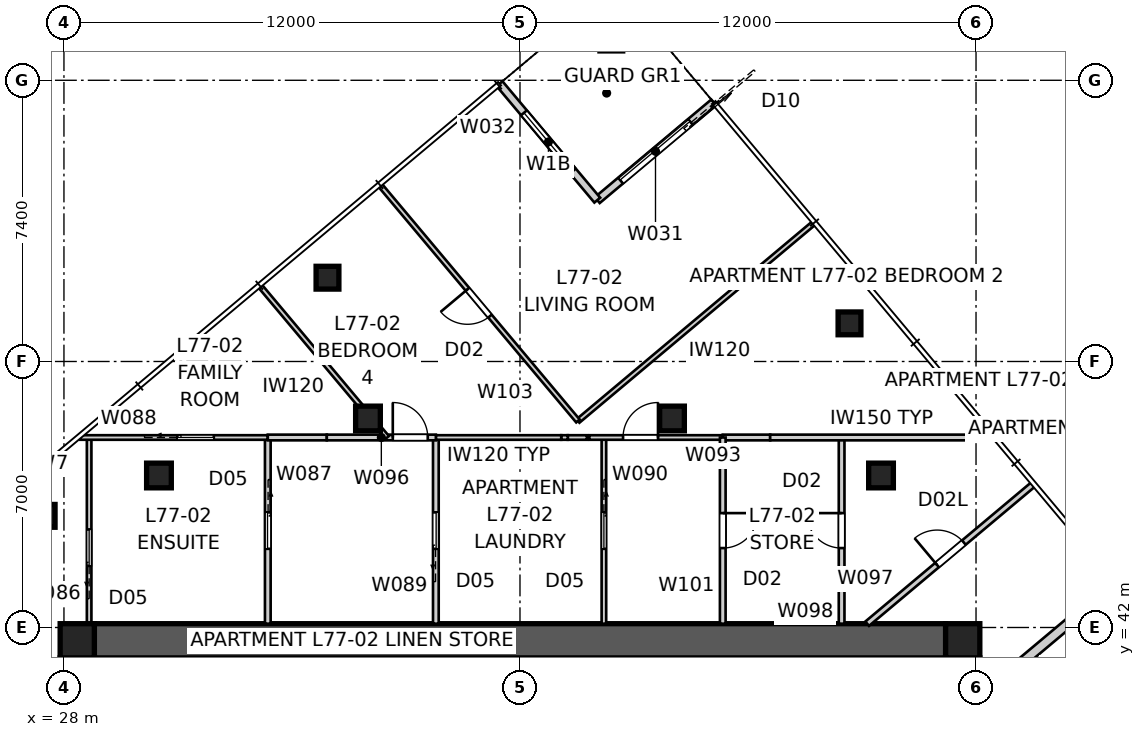
"""IFC4 building model, lengths in metres.
Left out: names, types, materials, properties, quantities, classifications, styles, units other than length and angle.
Written with IfcOpenShell. Run it as: python <this file> out.ifc"""

import sys

from ifc_helpers import new_model, si_unit, direction, frame, frame_2d, origin, origin_2d, place, context, subcontext, project, spatial, polyline, rectangle, outline, extrude, element, fill, save


model = new_model("IFC4")
c1 = context("Model", 3, precision=1e-05, world=origin(), true_north=direction((0.0, 1.0)))
c2 = subcontext(c1, "Body", "Model", "MODEL_VIEW")
j1 = project(units=[si_unit("LENGTHUNIT", "METRE"), si_unit("PLANEANGLEUNIT", "RADIAN")], contexts=[c1])
p1 = place(None, origin())
s1 = spatial("IfcSite", under=j1, at=p1, CompositionType="ELEMENT")
p2 = place(p1, origin())
s2 = spatial("IfcBuilding", under=s1, at=p2, CompositionType="ELEMENT")
p3 = place(p2, frame((0.0, 0.0, 279.4)))
s3 = spatial("IfcBuildingStorey", under=s2, at=p3, CompositionType="ELEMENT", Elevation=279.4)
p4 = place(p3, frame((28.8, 41.65, 0.0), z_axis=(0.0, 0.0, 1.0), x_axis=(1.0, 0.0, 0.0)))
e1 = element("IfcWall", 1, at=p4, inside=s3, PredefinedType="SHEAR", context=c2, shape_type="SweptSolid", body=[
    extrude(outline(polyline([(0.0, -0.45), (22.4, -0.45), (22.4, -0.025), (22.85, -0.025), (22.85, 0.025), (22.4, 0.025), (22.4, 0.45), (0.0, 0.45), (0.0, 0.025), (-0.45, 0.025), (-0.45, -0.025), (0.0, -0.025), (0.0, -0.45)])), origin(), (0.0, 0.0, 1.0), 3.4),
])
p5 = place(p3, frame((51.65, 18.8, 0.0), z_axis=(0.0, 0.0, 1.0), x_axis=(0.0, 1.0, 0.0)))
e2 = element("IfcWall", 2, at=p5, inside=s3, PredefinedType="SHEAR", context=c2, shape_type="SweptSolid", body=[
    extrude(outline(polyline([(0.0, -0.45), (22.4, -0.45), (22.4, -0.025), (22.85, -0.025), (22.85, 0.025), (22.4, 0.025), (22.4, 0.45), (0.0, 0.45), (0.0, 0.025), (-0.45, 0.025), (-0.45, -0.025), (0.0, -0.025), (0.0, -0.45)])), origin(), (0.0, 0.0, 1.0), 3.4),
])
p6 = place(p5, frame((11.14, 0.0, 0.0)))
e3 = element("IfcOpeningElement", 3, at=p6, cuts=e2, PredefinedType="OPENING", context=c2, shape_type="SweptSolid", body=[
    extrude(rectangle(XDim=1.02, YDim=2.4, at=frame_2d((0.51, 1.2))), frame((0.0, 0.46, 0.0), z_axis=(0.0, -1.0, 0.0), x_axis=(1.0, 0.0, 0.0)), (0.0, 0.0, 1.0), 0.92),
])
p7 = place(p3, frame((28.35, 41.2, 0.0), z_axis=(0.0, 0.0, 1.0), x_axis=(0.0, -1.0, 0.0)))
e4 = element("IfcWall", 4, at=p7, inside=s3, PredefinedType="SHEAR", context=c2, shape_type="SweptSolid", body=[
    extrude(outline(polyline([(0.0, -0.45), (22.4, -0.45), (22.4, -0.025), (22.85, -0.025), (22.85, 0.025), (22.4, 0.025), (22.4, 0.45), (0.0, 0.45), (0.0, 0.025), (-0.45, 0.025), (-0.45, -0.025), (0.0, -0.025), (0.0, -0.45)])), origin(), (0.0, 0.0, 1.0), 3.4),
])
p8 = place(p7, frame((11.14, 0.0, 0.0)))
e5 = element("IfcOpeningElement", 5, at=p8, cuts=e4, PredefinedType="OPENING", context=c2, shape_type="SweptSolid", body=[
    extrude(rectangle(XDim=1.02, YDim=2.4, at=frame_2d((0.51, 1.2))), frame((0.0, 0.46, 0.0), z_axis=(0.0, -1.0, 0.0), x_axis=(1.0, 0.0, 0.0)), (0.0, 0.0, 1.0), 0.92),
])
for number, where, z_axis, x_axis in (
    (6, (51.65, 41.65, 0.0), (0.0, 0.0, 1.0), (1.0, 0.0, 0.0)),
    (7, (28.35, 41.65, 0.0), (0.0, 0.0, 1.0), (1.0, 0.0, 0.0)),
):
    element("IfcColumn", number, at=place(p3, frame(where, z_axis=z_axis, x_axis=x_axis)), inside=s3, PredefinedType="COLUMN", context=c2, shape_type="SweptSolid", body=[
        extrude(rectangle(XDim=0.9, YDim=0.9, at=origin_2d()), origin(), (0.0, 0.0, 1.0), 3.4),
    ])
for number, where, z_axis, x_axis in (
    (8, (48.671, 50.003, 0.0), (0.0, 0.0, 1.0), (1.0, 0.0, 0.0)),
    (9, (34.935, 51.205, 0.0), (0.0, 0.0, 1.0), (1.0, 0.0, 0.0)),
    (10, (27.466, 44.938, 0.0), (0.0, 0.0, 1.0), (1.0, 0.0, 0.0)),
):
    element("IfcColumn", number, at=place(p3, frame(where, z_axis=z_axis, x_axis=x_axis)), inside=s3, PredefinedType="COLUMN", context=c2, shape_type="SweptSolid", body=[
        extrude(rectangle(XDim=0.6, YDim=0.6, at=origin_2d()), origin(), (0.0, 0.0, 1.0), 3.4),
    ])
for number, where, z_axis, x_axis in (
    (11, (49.5, 46.0, 0.0), (0.0, 0.0, 1.0), (1.0, 0.0, 0.0)),
    (12, (44.0, 47.5, 0.0), (0.0, 0.0, 1.0), (1.0, 0.0, 0.0)),
    (13, (36.0, 47.5, 0.0), (0.0, 0.0, 1.0), (1.0, 0.0, 0.0)),
    (14, (30.5, 46.0, 0.0), (0.0, 0.0, 1.0), (1.0, 0.0, 0.0)),
):
    element("IfcColumn", number, at=place(p3, frame(where, z_axis=z_axis, x_axis=x_axis)), inside=s3, PredefinedType="COLUMN", context=c2, shape_type="SweptSolid", body=[
        extrude(rectangle(XDim=0.65, YDim=0.65, at=origin_2d()), origin(), (0.0, 0.0, 1.0), 3.4),
    ])
p9 = place(p3, frame((45.098, 55.817, 0.0), z_axis=(0.0, 0.0, 1.0), x_axis=(-0.766060656284, -0.642768287094, 0.0)))
e15 = element("IfcWall", 15, at=p9, inside=s3, PredefinedType="SOLIDWALL", context=c2, shape_type="SweptSolid", body=[
    extrude(rectangle(XDim=4.0, YDim=0.2, at=frame_2d((2.0, 0.0))), origin(), (0.0, 0.0, 1.0), 3.25),
])
p10 = place(p9, frame((0.8, 0.0, 0.0)))
e16 = element("IfcOpeningElement", 16, at=p10, cuts=e15, PredefinedType="OPENING", context=c2, shape_type="SweptSolid", body=[
    extrude(rectangle(XDim=2.4, YDim=2.4, at=frame_2d((1.2, 1.2))), frame((0.0, 0.11, 0.0), z_axis=(0.0, -1.0, 0.0), x_axis=(1.0, 0.0, 0.0)), (0.0, 0.0, 1.0), 0.22),
])
p11 = place(p3, frame((42.034, 53.246, 0.0), z_axis=(0.0, 0.0, 1.0), x_axis=(-0.642798342015, 0.766035437498, 0.0)))
e17 = element("IfcWall", 17, at=p11, inside=s3, PredefinedType="SOLIDWALL", context=c2, shape_type="SweptSolid", body=[
    extrude(rectangle(XDim=4.0, YDim=0.2, at=frame_2d((2.0, 0.0))), origin(), (0.0, 0.0, 1.0), 3.25),
])
p12 = place(p11, frame((1.0, 0.0, 0.45)))
e18 = element("IfcOpeningElement", 18, at=p12, cuts=e17, PredefinedType="OPENING", context=c2, shape_type="SweptSolid", body=[
    extrude(rectangle(XDim=2.0, YDim=1.8, at=frame_2d((1.0, 0.9))), frame((0.0, 0.11, 0.0), z_axis=(0.0, -1.0, 0.0), x_axis=(1.0, 0.0, 0.0)), (0.0, 0.0, 1.0), 0.22),
])
p13 = place(p3, frame((55.704, 43.177, 0.0), z_axis=(0.0, 0.0, 1.0), x_axis=(-0.76603440109, -0.64279957712, 0.0)))
e19 = element("IfcWall", 19, at=p13, inside=s3, PredefinedType="PARTITIONING", context=c2, shape_type="SweptSolid", body=[
    extrude(rectangle(XDim=4.64, YDim=0.25, at=frame_2d((2.32, 0.0))), origin(), (0.0, 0.0, 1.0), 3.25),
])
p14 = place(p3, frame((28.663, 41.18, 0.0), z_axis=(0.0, 0.0, 1.0), x_axis=(0.0, 1.0, 0.0)))
e20 = element("IfcWall", 20, at=p14, inside=s3, PredefinedType="PARTITIONING", context=c2, shape_type="SweptSolid", body=[
    extrude(rectangle(XDim=5.82, YDim=0.12, at=frame_2d((2.91, 0.0))), origin(), (0.0, 0.0, 1.0), 3.25),
])
p15 = place(p14, frame((2.44, 0.0, 0.0)))
e21 = element("IfcOpeningElement", 21, at=p15, cuts=e20, PredefinedType="OPENING", context=c2, shape_type="SweptSolid", body=[
    extrude(rectangle(XDim=0.96, YDim=2.1, at=frame_2d((0.48, 1.05))), frame((0.0, 0.07, 0.0), z_axis=(0.0, -1.0, 0.0), x_axis=(1.0, 0.0, 0.0)), (0.0, 0.0, 1.0), 0.14),
])
p16 = place(p3, frame((33.364, 47.0, 0.0), z_axis=(0.0, 0.0, 1.0), x_axis=(0.0, -1.0, 0.0)))
e22 = element("IfcWall", 22, at=p16, inside=s3, PredefinedType="SOLIDWALL", context=c2, shape_type="SweptSolid", body=[
    extrude(rectangle(XDim=4.9, YDim=0.15, at=frame_2d((2.45, 0.0))), origin(), (0.0, 0.0, 1.0), 3.25),
])
p17 = place(p16, frame((1.97, 0.0, 0.0)))
e23 = element("IfcOpeningElement", 23, at=p17, cuts=e22, PredefinedType="OPENING", context=c2, shape_type="SweptSolid", body=[
    extrude(rectangle(XDim=0.96, YDim=2.1, at=frame_2d((0.48, 1.05))), frame((0.0, 0.085, 0.0), z_axis=(0.0, -1.0, 0.0), x_axis=(1.0, 0.0, 0.0)), (0.0, 0.0, 1.0), 0.17),
])
p18 = place(p3, frame((28.43, 47.0, 0.0), z_axis=(0.0, 0.0, 1.0), x_axis=(1.0, 0.0, 0.0)))
e24 = element("IfcWall", 24, at=p18, inside=s3, PredefinedType="PARTITIONING", context=c2, shape_type="SweptSolid", body=[
    extrude(rectangle(XDim=4.934, YDim=0.12, at=frame_2d((2.467, 0.0))), origin(), (0.0, 0.0, 1.0), 3.25),
])
p19 = place(p18, frame((2.553, 0.0, 0.0)))
e25 = element("IfcOpeningElement", 25, at=p19, cuts=e24, PredefinedType="OPENING", context=c2, shape_type="SweptSolid", body=[
    extrude(rectangle(XDim=0.96, YDim=2.1, at=frame_2d((0.48, 1.05))), frame((0.0, 0.07, 0.0), z_axis=(0.0, -1.0, 0.0), x_axis=(1.0, 0.0, 0.0)), (0.0, 0.0, 1.0), 0.14),
])
p20 = place(p3, frame((37.786, 42.1, 0.0), z_axis=(0.0, 0.0, 1.0), x_axis=(0.0, 1.0, 0.0)))
e26 = element("IfcWall", 26, at=p20, inside=s3, PredefinedType="SOLIDWALL", context=c2, shape_type="SweptSolid", body=[
    extrude(rectangle(XDim=4.9, YDim=0.15, at=frame_2d((2.45, 0.0))), origin(), (0.0, 0.0, 1.0), 3.25),
])
p21 = place(p20, frame((1.97, 0.0, 0.0)))
e27 = element("IfcOpeningElement", 27, at=p21, cuts=e26, PredefinedType="OPENING", context=c2, shape_type="SweptSolid", body=[
    extrude(rectangle(XDim=0.96, YDim=2.1, at=frame_2d((0.48, 1.05))), frame((0.0, 0.085, 0.0), z_axis=(0.0, -1.0, 0.0), x_axis=(1.0, 0.0, 0.0)), (0.0, 0.0, 1.0), 0.17),
])
p22 = place(p3, frame((42.208, 47.0, 0.0), z_axis=(0.0, 0.0, 1.0), x_axis=(0.0, -1.0, 0.0)))
e28 = element("IfcWall", 28, at=p22, inside=s3, PredefinedType="PARTITIONING", context=c2, shape_type="SweptSolid", body=[
    extrude(rectangle(XDim=4.9, YDim=0.12, at=frame_2d((2.45, 0.0))), origin(), (0.0, 0.0, 1.0), 3.25),
])
p23 = place(p22, frame((1.97, 0.0, 0.0)))
e29 = element("IfcOpeningElement", 29, at=p23, cuts=e28, PredefinedType="OPENING", context=c2, shape_type="SweptSolid", body=[
    extrude(rectangle(XDim=0.96, YDim=2.1, at=frame_2d((0.48, 1.05))), frame((0.0, 0.07, 0.0), z_axis=(0.0, -1.0, 0.0), x_axis=(1.0, 0.0, 0.0)), (0.0, 0.0, 1.0), 0.14),
])
p24 = place(p3, frame((41.258, 47.0, 0.0), z_axis=(0.0, 0.0, 1.0), x_axis=(1.0, 0.0, 0.0)))
e30 = element("IfcWall", 30, at=p24, inside=s3, PredefinedType="PARTITIONING", context=c2, shape_type="SweptSolid", body=[
    extrude(rectangle(XDim=0.504, YDim=0.12, at=frame_2d((0.252, 0.0))), origin(), (0.0, 0.0, 1.0), 3.25),
])
p25 = place(p3, frame((41.824, 47.0, 0.0), z_axis=(0.0, 0.0, 1.0), x_axis=(1.0, 0.0, 0.0)))
e31 = element("IfcWall", 31, at=p25, inside=s3, PredefinedType="PARTITIONING", context=c2, shape_type="SweptSolid", body=[
    extrude(rectangle(XDim=3.511, YDim=0.12, at=frame_2d((1.756, 0.0))), origin(), (0.0, 0.0, 1.0), 3.25),
])
p26 = place(p25, frame((0.887, 0.0, 0.0)))
e32 = element("IfcOpeningElement", 32, at=p26, cuts=e31, PredefinedType="OPENING", context=c2, shape_type="SweptSolid", body=[
    extrude(rectangle(XDim=0.92, YDim=2.34, at=frame_2d((0.46, 1.17))), frame((0.0, 0.07, 0.0), z_axis=(0.0, -1.0, 0.0), x_axis=(1.0, 0.0, 0.0)), (0.0, 0.0, 1.0), 0.14),
])
p27 = place(p3, frame((37.786, 47.0, 0.0), z_axis=(0.0, 0.0, 1.0), x_axis=(1.0, 0.0, 0.0)))
e33 = element("IfcWall", 33, at=p27, inside=s3, PredefinedType="PARTITIONING", context=c2, shape_type="SweptSolid", body=[
    extrude(rectangle(XDim=3.299, YDim=0.12, at=frame_2d((1.65, 0.0))), origin(), (0.0, 0.0, 1.0), 3.25),
])
p28 = place(p3, frame((33.364, 47.0, 0.0), z_axis=(0.0, 0.0, 1.0), x_axis=(1.0, 0.0, 0.0)))
e34 = element("IfcWall", 34, at=p28, inside=s3, PredefinedType="SOLIDWALL", context=c2, shape_type="SweptSolid", body=[
    extrude(rectangle(XDim=1.553, YDim=0.15, at=frame_2d((0.776, 0.0))), origin(), (0.0, 0.0, 1.0), 2.55),
])
p29 = place(p3, frame((34.917, 47.0, 0.0), z_axis=(0.0, 0.0, 1.0), x_axis=(1.0, 0.0, 0.0)))
e35 = element("IfcWall", 35, at=p29, inside=s3, PredefinedType="SOLIDWALL", context=c2, shape_type="SweptSolid", body=[
    extrude(rectangle(XDim=2.869, YDim=0.15, at=frame_2d((1.435, 0.0))), origin(), (0.0, 0.0, 1.0), 3.25),
])
p30 = place(p29, frame((1.736, 0.0, 0.0)))
e36 = element("IfcOpeningElement", 36, at=p30, cuts=e35, PredefinedType="OPENING", context=c2, shape_type="SweptSolid", body=[
    extrude(rectangle(XDim=0.92, YDim=2.34, at=frame_2d((0.46, 1.17))), frame((0.0, 0.085, 0.0), z_axis=(0.0, -1.0, 0.0), x_axis=(1.0, 0.0, 0.0)), (0.0, 0.0, 1.0), 0.17),
])
p31 = place(p3, frame((49.136, 42.1, 0.0), z_axis=(0.0, 0.0, 1.0), x_axis=(0.766055078255, 0.642774935012, 0.0)))
e37 = element("IfcWall", 37, at=p31, inside=s3, PredefinedType="SOLIDWALL", context=c2, shape_type="SweptSolid", body=[
    extrude(rectangle(XDim=5.684, YDim=0.15, at=frame_2d((2.842, 0.0))), origin(), (0.0, 0.0, 1.0), 3.25),
])
p32 = place(p31, frame((2.402, 0.0, 0.0)))
e38 = element("IfcOpeningElement", 38, at=p32, cuts=e37, PredefinedType="OPENING", context=c2, shape_type="SweptSolid", body=[
    extrude(rectangle(XDim=0.92, YDim=2.1, at=frame_2d((0.46, 1.05))), frame((0.0, 0.085, 0.0), z_axis=(0.0, -1.0, 0.0), x_axis=(1.0, 0.0, 0.0)), (0.0, 0.0, 1.0), 0.17),
])
p33 = place(p3, frame((48.463, 42.1, 0.0), z_axis=(0.0, 0.0, 1.0), x_axis=(0.0, 1.0, 0.0)))
e39 = element("IfcWall", 39, at=p33, inside=s3, PredefinedType="SOLIDWALL", context=c2, shape_type="SweptSolid", body=[
    extrude(rectangle(XDim=4.9, YDim=0.15, at=frame_2d((2.45, 0.0))), origin(), (0.0, 0.0, 1.0), 3.25),
])
p34 = place(p33, frame((1.99, 0.0, 0.0)))
e40 = element("IfcOpeningElement", 40, at=p34, cuts=e39, PredefinedType="OPENING", context=c2, shape_type="SweptSolid", body=[
    extrude(rectangle(XDim=0.92, YDim=2.34, at=frame_2d((0.46, 1.17))), frame((0.0, 0.085, 0.0), z_axis=(0.0, -1.0, 0.0), x_axis=(1.0, 0.0, 0.0)), (0.0, 0.0, 1.0), 0.17),
])
p35 = place(p3, frame((45.336, 47.0, 0.0), z_axis=(0.0, 0.0, 1.0), x_axis=(1.0, 0.0, 0.0)))
e41 = element("IfcWall", 41, at=p35, inside=s3, PredefinedType="SOLIDWALL", context=c2, shape_type="SweptSolid", body=[
    extrude(rectangle(XDim=1.248, YDim=0.15, at=frame_2d((0.624, 0.0))), origin(), (0.0, 0.0, 1.0), 2.55),
])
p36 = place(p3, frame((46.583, 47.0, 0.0), z_axis=(0.0, 0.0, 1.0), x_axis=(1.0, 0.0, 0.0)))
e42 = element("IfcWall", 42, at=p36, inside=s3, PredefinedType="SOLIDWALL", context=c2, shape_type="SweptSolid", body=[
    extrude(rectangle(XDim=5.86, YDim=0.15, at=frame_2d((2.93, 0.0))), origin(), (0.0, 0.0, 1.0), 3.25),
])
p37 = place(p3, frame((45.336, 47.0, 0.0), z_axis=(0.0, 0.0, 1.0), x_axis=(0.0, -1.0, 0.0)))
e43 = element("IfcWall", 43, at=p37, inside=s3, PredefinedType="SOLIDWALL", context=c2, shape_type="SweptSolid", body=[
    extrude(rectangle(XDim=4.9, YDim=0.15, at=frame_2d((2.45, 0.0))), origin(), (0.0, 0.0, 1.0), 3.25),
])
p38 = place(p37, frame((1.99, 0.0, 0.0)))
e44 = element("IfcOpeningElement", 44, at=p38, cuts=e43, PredefinedType="OPENING", context=c2, shape_type="SweptSolid", body=[
    extrude(rectangle(XDim=0.92, YDim=2.34, at=frame_2d((0.46, 1.17))), frame((0.0, 0.085, 0.0), z_axis=(0.0, -1.0, 0.0), x_axis=(1.0, 0.0, 0.0)), (0.0, 0.0, 1.0), 0.17),
])
p39 = place(p3, frame((47.719, 52.631, 0.0), z_axis=(0.0, 0.0, 1.0), x_axis=(-0.766033729027, -0.642800378028, 0.0)))
e45 = element("IfcWall", 45, at=p39, inside=s3, PredefinedType="PARTITIONING", context=c2, shape_type="SweptSolid", body=[
    extrude(rectangle(XDim=8.085, YDim=0.12, at=frame_2d((4.042, 0.0))), origin(), (0.0, 0.0, 1.0), 3.25),
])
p40 = place(p3, frame((41.525, 47.434, 0.0), z_axis=(0.0, 0.0, 1.0), x_axis=(-0.642800378028, 0.766033729027, 0.0)))
e46 = element("IfcWall", 46, at=p40, inside=s3, PredefinedType="PARTITIONING", context=c2, shape_type="SweptSolid", body=[
    extrude(rectangle(XDim=8.085, YDim=0.12, at=frame_2d((4.042, 0.0))), origin(), (0.0, 0.0, 1.0), 3.25),
])
p41 = place(p40, frame((3.603, 0.0, 0.0)))
e47 = element("IfcOpeningElement", 47, at=p41, cuts=e46, PredefinedType="OPENING", context=c2, shape_type="SweptSolid", body=[
    extrude(rectangle(XDim=0.92, YDim=2.34, at=frame_2d((0.46, 1.17))), frame((0.0, 0.07, 0.0), z_axis=(0.0, -1.0, 0.0), x_axis=(1.0, 0.0, 0.0)), (0.0, 0.0, 1.0), 0.14),
])
p42 = place(p3, frame((36.505, 47.0, 0.0), z_axis=(0.0, 0.0, 1.0), x_axis=(-0.642776136034, 0.76605407051, 0.0)))
e48 = element("IfcWall", 48, at=p42, inside=s3, PredefinedType="PARTITIONING", context=c2, shape_type="SweptSolid", body=[
    extrude(rectangle(XDim=5.191, YDim=0.12, at=frame_2d((2.595, 0.0))), origin(), (0.0, 0.0, 1.0), 3.25),
])
p43 = place(p3, frame((41.258, 47.0, 0.0), z_axis=(0.0, 0.0, 1.0), x_axis=(-1.0, 0.0, 0.0)))
e49 = element("IfcWall", 49, at=p43, inside=s3, PredefinedType="PARTITIONING", context=c2, shape_type="SweptSolid", body=[
    extrude(rectangle(XDim=0.172, YDim=0.12, at=frame_2d((0.086, 0.0))), origin(), (0.0, 0.0, 1.0), 3.25),
])
p44 = place(p10, origin())
e50 = element("IfcDoor", 50, at=p44, inside=s3, OperationType="SLIDING_TO_LEFT", PredefinedType="DOOR", context=c2, shape_type="SweptSolid", body=[
    extrude(rectangle(XDim=2.4, YDim=2.4, at=frame_2d((1.2, 1.2))), frame((0.0, 0.025, 0.0), z_axis=(0.0, -1.0, 0.0), x_axis=(1.0, 0.0, 0.0)), (0.0, 0.0, 1.0), 0.05),
])
fill(e16, e50)
p45 = place(p12, origin())
e51 = element("IfcWindow", 51, at=p45, inside=s3, PartitioningType="SINGLE_PANEL", PredefinedType="WINDOW", context=c2, shape_type="SweptSolid", body=[
    extrude(rectangle(XDim=2.0, YDim=1.8, at=frame_2d((1.0, 0.9))), frame((0.0, 0.03, 0.0), z_axis=(0.0, -1.0, 0.0), x_axis=(1.0, 0.0, 0.0)), (0.0, 0.0, 1.0), 0.06),
])
fill(e18, e51)
p46 = place(p15, origin())
e52 = element("IfcDoor", 52, at=p46, inside=s3, OperationType="SLIDING_TO_LEFT", PredefinedType="DOOR", context=c2, shape_type="SweptSolid", body=[
    extrude(rectangle(XDim=0.96, YDim=2.1, at=frame_2d((0.48, 1.05))), frame((0.0, 0.025, 0.0), z_axis=(0.0, -1.0, 0.0), x_axis=(1.0, 0.0, 0.0)), (0.0, 0.0, 1.0), 0.05),
])
fill(e21, e52)
p47 = place(p17, origin())
e53 = element("IfcDoor", 53, at=p47, inside=s3, OperationType="SLIDING_TO_LEFT", PredefinedType="DOOR", context=c2, shape_type="SweptSolid", body=[
    extrude(rectangle(XDim=0.96, YDim=2.1, at=frame_2d((0.48, 1.05))), frame((0.0, 0.025, 0.0), z_axis=(0.0, -1.0, 0.0), x_axis=(1.0, 0.0, 0.0)), (0.0, 0.0, 1.0), 0.05),
])
fill(e23, e53)
p48 = place(p19, origin())
e54 = element("IfcDoor", 54, at=p48, inside=s3, OperationType="SLIDING_TO_LEFT", PredefinedType="DOOR", context=c2, shape_type="SweptSolid", body=[
    extrude(rectangle(XDim=0.96, YDim=2.1, at=frame_2d((0.48, 1.05))), frame((0.0, 0.025, 0.0), z_axis=(0.0, -1.0, 0.0), x_axis=(1.0, 0.0, 0.0)), (0.0, 0.0, 1.0), 0.05),
])
fill(e25, e54)
p49 = place(p21, origin())
e55 = element("IfcDoor", 55, at=p49, inside=s3, OperationType="SLIDING_TO_LEFT", PredefinedType="DOOR", context=c2, shape_type="SweptSolid", body=[
    extrude(rectangle(XDim=0.96, YDim=2.1, at=frame_2d((0.48, 1.05))), frame((0.0, 0.025, 0.0), z_axis=(0.0, -1.0, 0.0), x_axis=(1.0, 0.0, 0.0)), (0.0, 0.0, 1.0), 0.05),
])
fill(e27, e55)
p50 = place(p30, origin())
e56 = element("IfcDoor", 56, at=p50, inside=s3, OperationType="SINGLE_SWING_LEFT", PredefinedType="DOOR", context=c2, shape_type="SweptSolid", body=[
    extrude(rectangle(XDim=0.92, YDim=2.34, at=frame_2d((0.46, 1.17))), frame((0.0, 0.025, 0.0), z_axis=(0.0, -1.0, 0.0), x_axis=(1.0, 0.0, 0.0)), (0.0, 0.0, 1.0), 0.05),
])
fill(e36, e56)
p51 = place(p23, origin())
e57 = element("IfcDoor", 57, at=p51, inside=s3, OperationType="SLIDING_TO_LEFT", PredefinedType="DOOR", context=c2, shape_type="SweptSolid", body=[
    extrude(rectangle(XDim=0.96, YDim=2.1, at=frame_2d((0.48, 1.05))), frame((0.0, 0.025, 0.0), z_axis=(0.0, -1.0, 0.0), x_axis=(1.0, 0.0, 0.0)), (0.0, 0.0, 1.0), 0.05),
])
fill(e29, e57)
p52 = place(p38, origin())
e58 = element("IfcDoor", 58, at=p52, inside=s3, OperationType="SINGLE_SWING_LEFT", PredefinedType="DOOR", context=c2, shape_type="SweptSolid", body=[
    extrude(rectangle(XDim=0.92, YDim=2.34, at=frame_2d((0.46, 1.17))), frame((0.0, 0.025, 0.0), z_axis=(0.0, -1.0, 0.0), x_axis=(1.0, 0.0, 0.0)), (0.0, 0.0, 1.0), 0.05),
])
fill(e44, e58)
p53 = place(p26, origin())
e59 = element("IfcDoor", 59, at=p53, inside=s3, OperationType="SINGLE_SWING_RIGHT", PredefinedType="DOOR", context=c2, shape_type="SweptSolid", body=[
    extrude(rectangle(XDim=0.92, YDim=2.34, at=frame_2d((0.46, 1.17))), frame((0.0, 0.025, 0.0), z_axis=(0.0, -1.0, 0.0), x_axis=(1.0, 0.0, 0.0)), (0.0, 0.0, 1.0), 0.05),
])
fill(e32, e59)
p54 = place(p34, origin())
e60 = element("IfcDoor", 60, at=p54, inside=s3, OperationType="SINGLE_SWING_RIGHT", PredefinedType="DOOR", context=c2, shape_type="SweptSolid", body=[
    extrude(rectangle(XDim=0.92, YDim=2.34, at=frame_2d((0.46, 1.17))), frame((0.0, 0.025, 0.0), z_axis=(0.0, -1.0, 0.0), x_axis=(1.0, 0.0, 0.0)), (0.0, 0.0, 1.0), 0.05),
])
fill(e40, e60)
p55 = place(p32, origin())
e61 = element("IfcDoor", 61, at=p55, inside=s3, OperationType="SINGLE_SWING_LEFT", PredefinedType="DOOR", context=c2, shape_type="SweptSolid", body=[
    extrude(rectangle(XDim=0.92, YDim=2.1, at=frame_2d((0.46, 1.05))), frame((0.0, 0.025, 0.0), z_axis=(0.0, -1.0, 0.0), x_axis=(1.0, 0.0, 0.0)), (0.0, 0.0, 1.0), 0.05),
])
fill(e38, e61)
p56 = place(p41, origin())
e62 = element("IfcDoor", 62, at=p56, inside=s3, OperationType="SINGLE_SWING_RIGHT", PredefinedType="DOOR", context=c2, shape_type="SweptSolid", body=[
    extrude(rectangle(XDim=0.92, YDim=2.34, at=frame_2d((0.46, 1.17))), frame((0.0, 0.025, 0.0), z_axis=(0.0, -1.0, 0.0), x_axis=(1.0, 0.0, 0.0)), (0.0, 0.0, 1.0), 0.05),
])
fill(e47, e62)
save(model, sys.argv[1])
